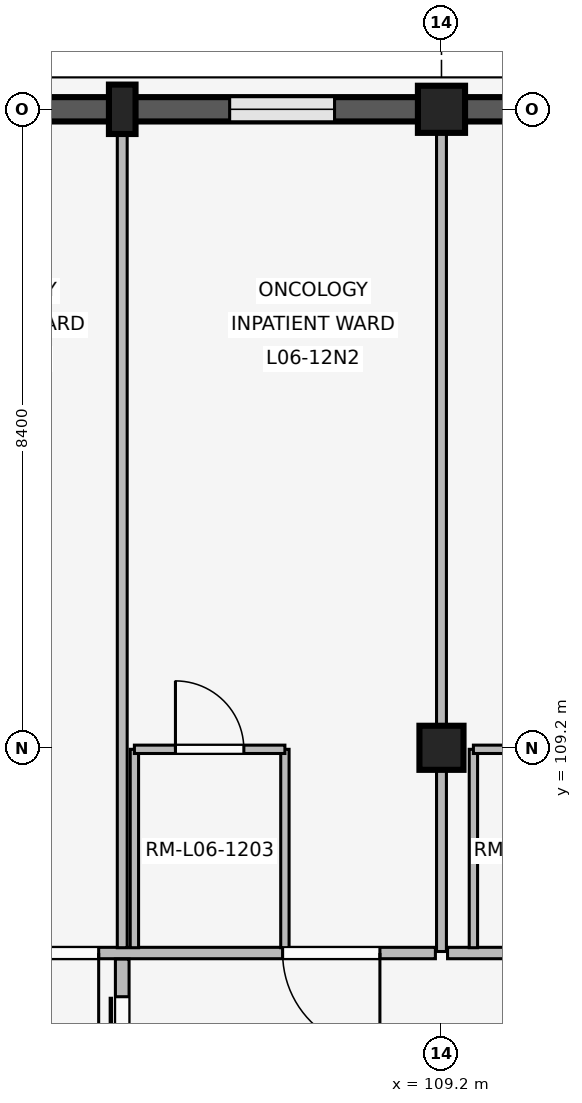
"""IFC4 building model, lengths in metres.
Left out: names, types, materials, properties, quantities, classifications, styles, units other than length and angle.
Written with IfcOpenShell. Run it as: python <this file> out.ifc"""

import sys

from ifc_helpers import new_model, si_unit, direction, frame, frame_2d, origin, origin_2d, place, context, subcontext, project, spatial, rectangle, extrude, element, fill, save


model = new_model("IFC4")
c1 = context("Model", 3, precision=1e-05, world=origin(), true_north=direction((0.0, 1.0)))
c2 = subcontext(c1, "Body", "Model", "MODEL_VIEW")
j1 = project(units=[si_unit("LENGTHUNIT", "METRE"), si_unit("PLANEANGLEUNIT", "RADIAN")], contexts=[c1])
p1 = place(None, origin())
s1 = spatial("IfcSite", under=j1, at=p1, CompositionType="ELEMENT")
p2 = place(p1, origin())
s2 = spatial("IfcBuilding", under=s1, at=p2, CompositionType="ELEMENT")
p3 = place(p2, frame((0.0, 0.0, 24.6)))
s3 = spatial("IfcBuildingStorey", under=s2, at=p3, CompositionType="ELEMENT", Elevation=24.6)
p4 = place(p3, frame((109.2, 109.2, 0.0), z_axis=(0.0, 0.0, 1.0), x_axis=(1.0, 0.0, 0.0)))
e1 = element("IfcColumn", 1, at=p4, inside=s3, PredefinedType="COLUMN", context=c2, shape_type="SweptSolid", body=[
    extrude(rectangle(XDim=0.58, YDim=0.58, at=origin_2d()), origin(), (0.0, 0.0, 1.0), 4.2),
])
p5 = place(p3, frame((109.2, 117.6, 0.0), z_axis=(0.0, 0.0, 1.0), x_axis=(1.0, 0.0, 0.0)))
e2 = element("IfcColumn", 2, at=p5, inside=s3, PredefinedType="COLUMN", context=c2, shape_type="SweptSolid", body=[
    extrude(rectangle(XDim=0.62, YDim=0.62, at=origin_2d()), origin(), (0.0, 0.0, 1.0), 4.2),
])
p6 = place(p3, frame((105.0, 117.6, 0.0), z_axis=(0.0, 0.0, 1.0), x_axis=(1.0, 0.0, 0.0)))
e3 = element("IfcColumn", 3, at=p6, inside=s3, PredefinedType="PILASTER", context=c2, shape_type="SweptSolid", body=[
    extrude(rectangle(XDim=0.35, YDim=0.65, at=origin_2d()), origin(), (0.0, 0.0, 1.0), 4.2),
])
p7 = place(p3, frame((101.105, 117.6, 0.0), z_axis=(0.0, 0.0, 1.0), x_axis=(1.0, 0.0, 0.0)))
e4 = element("IfcWall", 4, at=p7, inside=s3, PredefinedType="SOLIDWALL", context=c2, shape_type="SweptSolid", body=[
    extrude(rectangle(XDim=7.79, YDim=0.32, at=frame_2d((3.895, 0.0))), origin(), (0.0, 0.0, 1.0), 3.34),
])
p8 = place(p7, frame((1.102, 0.0, 0.85)))
e5 = element("IfcOpeningElement", 5, at=p8, cuts=e4, PredefinedType="OPENING", context=c2, shape_type="SweptSolid", body=[
    extrude(rectangle(XDim=1.38, YDim=1.5, at=frame_2d((0.69, 0.75))), frame((0.0, 0.17, 0.0), z_axis=(0.0, -1.0, 0.0), x_axis=(1.0, 0.0, 0.0)), (0.0, 0.0, 1.0), 0.34),
])
p9 = place(p7, frame((5.308, 0.0, 0.85)))
e6 = element("IfcOpeningElement", 6, at=p9, cuts=e4, PredefinedType="OPENING", context=c2, shape_type="SweptSolid", body=[
    extrude(rectangle(XDim=1.38, YDim=1.5, at=frame_2d((0.69, 0.75))), frame((0.0, 0.17, 0.0), z_axis=(0.0, -1.0, 0.0), x_axis=(1.0, 0.0, 0.0)), (0.0, 0.0, 1.0), 0.34),
])
p10 = place(p3, frame((109.505, 117.6, 0.0), z_axis=(0.0, 0.0, 1.0), x_axis=(1.0, 0.0, 0.0)))
e7 = element("IfcWall", 7, at=p10, inside=s3, PredefinedType="SOLIDWALL", context=c2, shape_type="SweptSolid", body=[
    extrude(rectangle(XDim=7.79, YDim=0.32, at=frame_2d((3.895, 0.0))), origin(), (0.0, 0.0, 1.0), 3.34),
])
p11 = place(p10, frame((1.012, 0.0, 0.85)))
e8 = element("IfcOpeningElement", 8, at=p11, cuts=e7, PredefinedType="OPENING", context=c2, shape_type="SweptSolid", body=[
    extrude(rectangle(XDim=1.56, YDim=1.7, at=frame_2d((0.78, 0.85))), frame((0.0, 0.17, 0.0), z_axis=(0.0, -1.0, 0.0), x_axis=(1.0, 0.0, 0.0)), (0.0, 0.0, 1.0), 0.34),
])
p12 = place(p10, frame((5.218, 0.0, 0.85)))
e9 = element("IfcOpeningElement", 9, at=p12, cuts=e7, PredefinedType="OPENING", context=c2, shape_type="SweptSolid", body=[
    extrude(rectangle(XDim=1.56, YDim=1.7, at=frame_2d((0.78, 0.85))), frame((0.0, 0.17, 0.0), z_axis=(0.0, -1.0, 0.0), x_axis=(1.0, 0.0, 0.0)), (0.0, 0.0, 1.0), 0.34),
])
p13 = place(p3, frame((109.12, 106.5, 0.0), z_axis=(0.0, 0.0, 1.0), x_axis=(-1.0, 0.0, 0.0)))
e10 = element("IfcWall", 10, at=p13, inside=s3, PredefinedType="PARTITIONING", context=c2, shape_type="SweptSolid", body=[
    extrude(rectangle(XDim=8.24, YDim=0.15, at=frame_2d((4.12, 0.0))), origin(), (0.0, 0.0, 1.0), 3.32),
])
p14 = place(p13, frame((0.73, 0.0, 0.0)))
e11 = element("IfcOpeningElement", 11, at=p14, cuts=e10, PredefinedType="OPENING", context=c2, shape_type="SweptSolid", body=[
    extrude(rectangle(XDim=1.28, YDim=2.2, at=frame_2d((0.64, 1.1))), frame((0.0, 0.085, 0.0), z_axis=(0.0, -1.0, 0.0), x_axis=(1.0, 0.0, 0.0)), (0.0, 0.0, 1.0), 0.17),
])
p15 = place(p13, frame((4.43, 0.0, 0.0)))
e12 = element("IfcOpeningElement", 12, at=p15, cuts=e10, PredefinedType="OPENING", context=c2, shape_type="SweptSolid", body=[
    extrude(rectangle(XDim=1.28, YDim=2.2, at=frame_2d((0.64, 1.1))), frame((0.0, 0.085, 0.0), z_axis=(0.0, -1.0, 0.0), x_axis=(1.0, 0.0, 0.0)), (0.0, 0.0, 1.0), 0.17),
])
p16 = place(p3, frame((105.0, 106.57, 0.0), z_axis=(0.0, 0.0, 1.0), x_axis=(0.0, 1.0, 0.0)))
e13 = element("IfcWall", 13, at=p16, inside=s3, PredefinedType="PARTITIONING", context=c2, shape_type="SweptSolid", body=[
    extrude(rectangle(XDim=10.93, YDim=0.13, at=frame_2d((5.465, 0.0))), origin(), (0.0, 0.0, 1.0), 3.32),
])
for number, where, z_axis, x_axis in (
    (14, (105.16, 106.57, 0.0), (0.0, 0.0, 1.0), (0.0, 1.0, 0.0)),
    (15, (107.14, 106.57, 0.0), (0.0, 0.0, 1.0), (0.0, 1.0, 0.0)),
):
    element("IfcWall", number, at=place(p3, frame(where, z_axis=z_axis, x_axis=x_axis)), inside=s3, PredefinedType="PARTITIONING", context=c2, shape_type="SweptSolid", body=[
        extrude(rectangle(XDim=2.61, YDim=0.11, at=frame_2d((1.305, 0.0))), origin(), (0.0, 0.0, 1.0), 3.32),
    ])
p17 = place(p3, frame((105.16, 109.18, 0.0), z_axis=(0.0, 0.0, 1.0), x_axis=(1.0, 0.0, 0.0)))
e16 = element("IfcWall", 16, at=p17, inside=s3, PredefinedType="PARTITIONING", context=c2, shape_type="SweptSolid", body=[
    extrude(rectangle(XDim=1.98, YDim=0.11, at=frame_2d((0.99, 0.0))), origin(), (0.0, 0.0, 1.0), 3.32),
])
p18 = place(p17, frame((0.54, 0.0, 0.0)))
e17 = element("IfcOpeningElement", 17, at=p18, cuts=e16, PredefinedType="OPENING", context=c2, shape_type="SweptSolid", body=[
    extrude(rectangle(XDim=0.9, YDim=2.1, at=frame_2d((0.45, 1.05))), frame((0.0, 0.065, 0.0), z_axis=(0.0, -1.0, 0.0), x_axis=(1.0, 0.0, 0.0)), (0.0, 0.0, 1.0), 0.13),
])
p19 = place(p3, frame((105.0, 103.58, 0.0), z_axis=(0.0, 0.0, 1.0), x_axis=(0.0, 1.0, 0.0)))
e18 = element("IfcWall", 18, at=p19, inside=s3, PredefinedType="PARTITIONING", context=c2, shape_type="SweptSolid", body=[
    extrude(rectangle(XDim=2.84, YDim=0.18, at=frame_2d((1.42, 0.0))), origin(), (0.0, 0.0, 1.0), 3.32),
])
p20 = place(p19, frame((0.495, 0.0, 0.0)))
e19 = element("IfcOpeningElement", 19, at=p20, cuts=e18, PredefinedType="OPENING", context=c2, shape_type="SweptSolid", body=[
    extrude(rectangle(XDim=1.85, YDim=2.3, at=frame_2d((0.925, 1.15))), frame((0.0, 0.1, 0.0), z_axis=(0.0, -1.0, 0.0), x_axis=(1.0, 0.0, 0.0)), (0.0, 0.0, 1.0), 0.2),
])
p21 = place(p3, frame((109.2, 106.52, 0.0), z_axis=(0.0, 0.0, 1.0), x_axis=(0.0, 1.0, 0.0)))
e20 = element("IfcWall", 20, at=p21, inside=s3, PredefinedType="PARTITIONING", context=c2, shape_type="SweptSolid", body=[
    extrude(rectangle(XDim=10.94, YDim=0.13, at=frame_2d((5.47, 0.0))), origin(), (0.0, 0.0, 1.0), 3.32),
])
p22 = place(p3, frame((117.52, 106.5, 0.0), z_axis=(0.0, 0.0, 1.0), x_axis=(-1.0, 0.0, 0.0)))
e21 = element("IfcWall", 21, at=p22, inside=s3, PredefinedType="PARTITIONING", context=c2, shape_type="SweptSolid", body=[
    extrude(rectangle(XDim=8.24, YDim=0.15, at=frame_2d((4.12, 0.0))), origin(), (0.0, 0.0, 1.0), 3.32),
])
p23 = place(p22, frame((0.73, 0.0, 0.0)))
e22 = element("IfcOpeningElement", 22, at=p23, cuts=e21, PredefinedType="OPENING", context=c2, shape_type="SweptSolid", body=[
    extrude(rectangle(XDim=1.28, YDim=2.2, at=frame_2d((0.64, 1.1))), frame((0.0, 0.085, 0.0), z_axis=(0.0, -1.0, 0.0), x_axis=(1.0, 0.0, 0.0)), (0.0, 0.0, 1.0), 0.17),
])
p24 = place(p22, frame((4.43, 0.0, 0.0)))
e23 = element("IfcOpeningElement", 23, at=p24, cuts=e21, PredefinedType="OPENING", context=c2, shape_type="SweptSolid", body=[
    extrude(rectangle(XDim=1.28, YDim=2.2, at=frame_2d((0.64, 1.1))), frame((0.0, 0.085, 0.0), z_axis=(0.0, -1.0, 0.0), x_axis=(1.0, 0.0, 0.0)), (0.0, 0.0, 1.0), 0.17),
])
p25 = place(p3, frame((109.62, 106.57, 0.0), z_axis=(0.0, 0.0, 1.0), x_axis=(0.0, 1.0, 0.0)))
e24 = element("IfcWall", 24, at=p25, inside=s3, PredefinedType="PARTITIONING", context=c2, shape_type="SweptSolid", body=[
    extrude(rectangle(XDim=2.61, YDim=0.11, at=frame_2d((1.305, 0.0))), origin(), (0.0, 0.0, 1.0), 3.32),
])
p26 = place(p3, frame((109.62, 109.18, 0.0), z_axis=(0.0, 0.0, 1.0), x_axis=(1.0, 0.0, 0.0)))
e25 = element("IfcWall", 25, at=p26, inside=s3, PredefinedType="PARTITIONING", context=c2, shape_type="SweptSolid", body=[
    extrude(rectangle(XDim=1.98, YDim=0.11, at=frame_2d((0.99, 0.0))), origin(), (0.0, 0.0, 1.0), 3.32),
])
p27 = place(p26, frame((0.54, 0.0, 0.0)))
e26 = element("IfcOpeningElement", 26, at=p27, cuts=e25, PredefinedType="OPENING", context=c2, shape_type="SweptSolid", body=[
    extrude(rectangle(XDim=0.9, YDim=2.1, at=frame_2d((0.45, 1.05))), frame((0.0, 0.065, 0.0), z_axis=(0.0, -1.0, 0.0), x_axis=(1.0, 0.0, 0.0)), (0.0, 0.0, 1.0), 0.13),
])
p28 = place(p9, origin())
e27 = element("IfcWindow", 27, at=p28, inside=s3, PartitioningType="SINGLE_PANEL", PredefinedType="WINDOW", context=c2, shape_type="SweptSolid", body=[
    extrude(rectangle(XDim=1.38, YDim=1.5, at=frame_2d((0.69, 0.75))), frame((0.0, 0.03, 0.0), z_axis=(0.0, -1.0, 0.0), x_axis=(1.0, 0.0, 0.0)), (0.0, 0.0, 1.0), 0.06),
])
fill(e6, e27)
p29 = place(p14, origin())
e28 = element("IfcDoor", 28, at=p29, inside=s3, OperationType="SINGLE_SWING_LEFT", PredefinedType="DOOR", context=c2, shape_type="SweptSolid", body=[
    extrude(rectangle(XDim=1.28, YDim=2.2, at=frame_2d((0.64, 1.1))), frame((0.0, 0.025, 0.0), z_axis=(0.0, -1.0, 0.0), x_axis=(1.0, 0.0, 0.0)), (0.0, 0.0, 1.0), 0.05),
])
fill(e11, e28)
p30 = place(p15, origin())
e29 = element("IfcDoor", 29, at=p30, inside=s3, OperationType="SINGLE_SWING_LEFT", PredefinedType="DOOR", context=c2, shape_type="SweptSolid", body=[
    extrude(rectangle(XDim=1.28, YDim=2.2, at=frame_2d((0.64, 1.1))), frame((0.0, 0.025, 0.0), z_axis=(0.0, -1.0, 0.0), x_axis=(1.0, 0.0, 0.0)), (0.0, 0.0, 1.0), 0.05),
])
fill(e12, e29)
p31 = place(p18, origin())
e30 = element("IfcDoor", 30, at=p31, inside=s3, OperationType="SINGLE_SWING_LEFT", PredefinedType="DOOR", context=c2, shape_type="SweptSolid", body=[
    extrude(rectangle(XDim=0.9, YDim=2.1, at=frame_2d((0.45, 1.05))), frame((0.0, 0.025, 0.0), z_axis=(0.0, -1.0, 0.0), x_axis=(1.0, 0.0, 0.0)), (0.0, 0.0, 1.0), 0.05),
])
fill(e17, e30)
p32 = place(p20, origin())
e31 = element("IfcDoor", 31, at=p32, inside=s3, OperationType="SLIDING_TO_LEFT", PredefinedType="DOOR", context=c2, shape_type="SweptSolid", body=[
    extrude(rectangle(XDim=1.85, YDim=2.3, at=frame_2d((0.925, 1.15))), frame((0.0, 0.025, 0.0), z_axis=(0.0, -1.0, 0.0), x_axis=(1.0, 0.0, 0.0)), (0.0, 0.0, 1.0), 0.05),
])
fill(e19, e31)
save(model, sys.argv[1])
